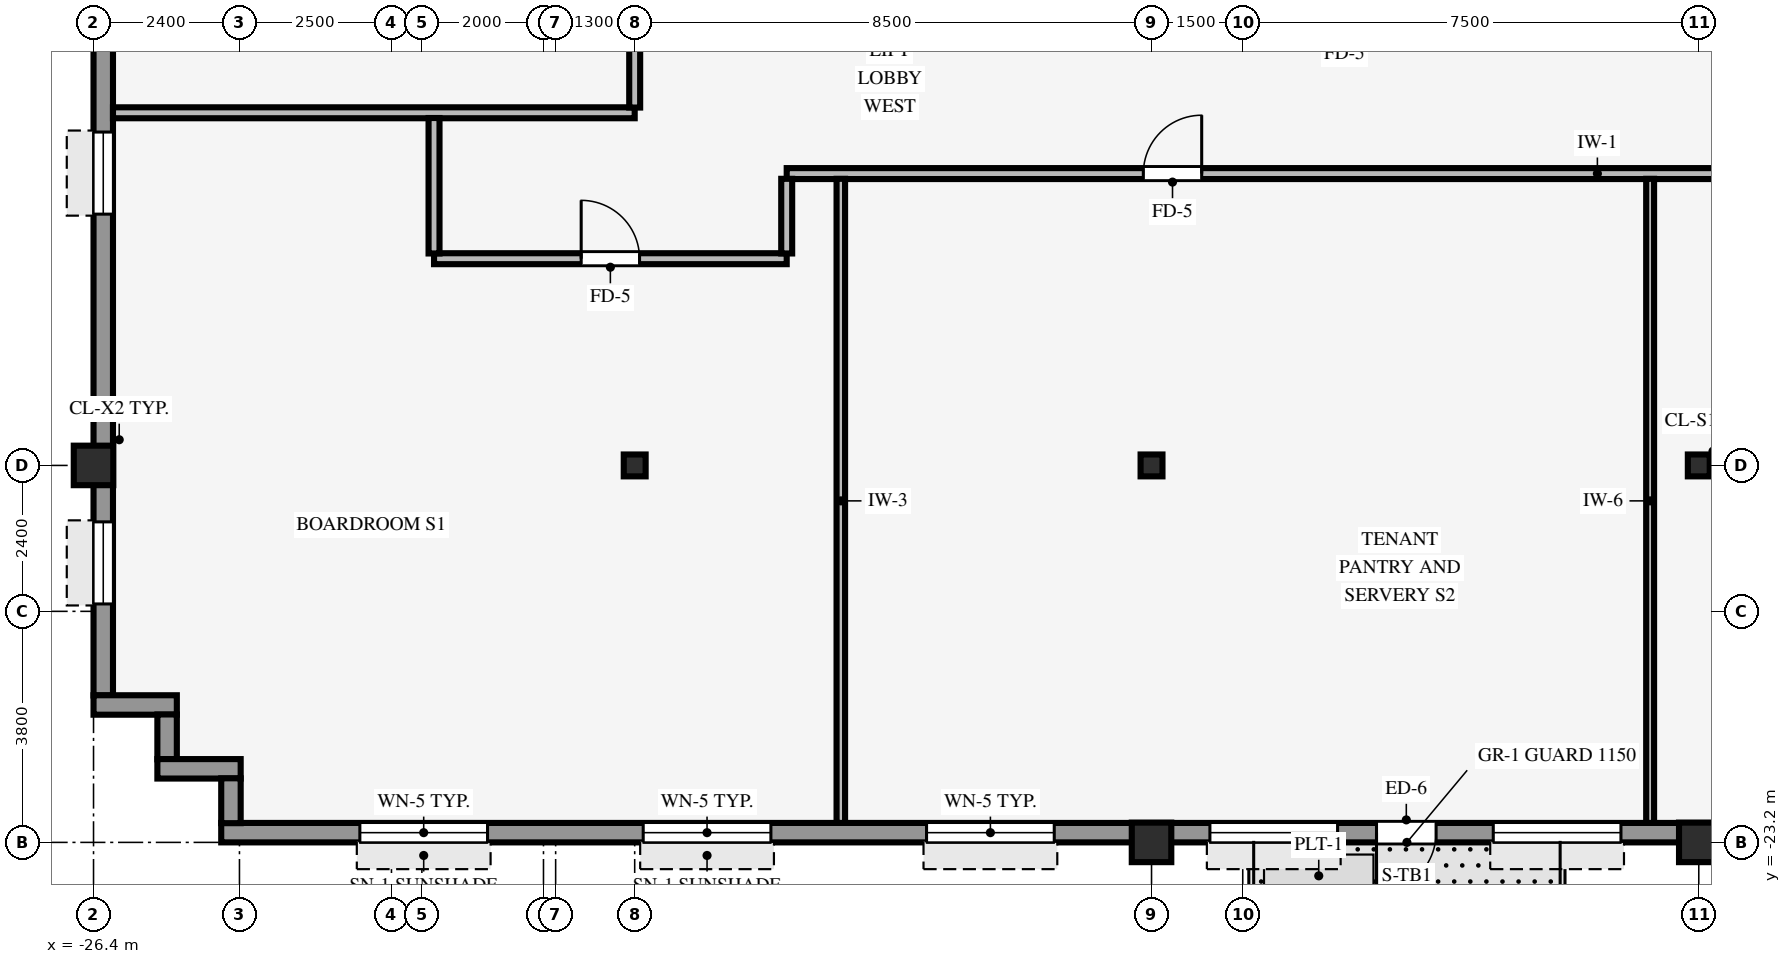
"""IFC4 building model, lengths in metres.
Left out: names, types, materials, properties, quantities, classifications, styles, units other than length and angle.
Written with IfcOpenShell. Run it as: python <this file> out.ifc"""

import sys

from ifc_helpers import new_model, si_unit, direction, frame, frame_2d, origin, origin_2d, place, context, subcontext, project, spatial, rectangle, hollow_rectangle, i_section, extrude, source, transform, mapped, element, fill, save


model = new_model("IFC4")
c1 = context("Model", 3, precision=1e-05, world=origin(), true_north=direction((0.0, 1.0)))
c2 = subcontext(c1, "Body", "Model", "MODEL_VIEW")
j1 = project(units=[si_unit("LENGTHUNIT", "METRE"), si_unit("PLANEANGLEUNIT", "RADIAN")], contexts=[c1])
p1 = place(None, origin())
s1 = spatial("IfcSite", under=j1, at=p1, CompositionType="ELEMENT")
p2 = place(p1, origin())
s2 = spatial("IfcBuilding", under=s1, at=p2, CompositionType="ELEMENT")
p3 = place(p2, frame((0.0, 0.0, 116.55)))
s3 = spatial("IfcBuildingStorey", under=s2, at=p3, CompositionType="ELEMENT", Elevation=116.55)
p4 = place(p3, frame((-26.4, -17.0, -0.4), z_axis=(0.0, 0.0, 1.0), x_axis=(1.0, 0.0, 0.0)))
e1 = element("IfcColumn", 1, at=p4, inside=s3, PredefinedType="COLUMN", context=c2, shape_type="SweptSolid", body=[
    extrude(hollow_rectangle(XDim=0.65, YDim=0.65, WallThickness=0.04, InnerFilletRadius=0.04, OuterFilletRadius=0.08, at=origin_2d()), origin(), (0.0, 0.0, 1.0), 3.77),
])
for number, where, z_axis, x_axis in (
    (2, (-9.0, -23.2, 0.0), (0.0, 0.0, 1.0), (1.0, 0.0, 0.0)),
    (3, (0.0, -23.2, 0.0), (0.0, 0.0, 1.0), (1.0, 0.0, 0.0)),
):
    element("IfcColumn", number, at=place(p3, frame(where, z_axis=z_axis, x_axis=x_axis)), inside=s3, PredefinedType="COLUMN", context=c2, shape_type="SweptSolid", body=[
        extrude(hollow_rectangle(XDim=0.65, YDim=0.65, WallThickness=0.04, InnerFilletRadius=0.04, OuterFilletRadius=0.08, at=origin_2d()), origin(), (0.0, 0.0, 1.0), 3.37),
    ])
for number, where, z_axis, x_axis in (
    (4, (0.0, -17.0, 0.0), (0.0, 0.0, 1.0), (1.0, 0.0, 0.0)),
    (5, (-17.5, -17.0, 0.0), (0.0, 0.0, 1.0), (1.0, 0.0, 0.0)),
    (6, (-9.0, -17.0, 0.0), (0.0, 0.0, 1.0), (1.0, 0.0, 0.0)),
):
    element("IfcColumn", number, at=place(p3, frame(where, z_axis=z_axis, x_axis=x_axis)), inside=s3, PredefinedType="COLUMN", context=c2, shape_type="SweptSolid", body=[
        extrude(i_section(OverallWidth=0.36, OverallDepth=0.36, WebThickness=0.021, FlangeThickness=0.021, FilletRadius=0.018, at=origin_2d()), origin(), (0.0, 0.0, 1.0), 3.37),
    ])
p5 = place(p3, frame((-24.3, -23.04, 0.0), z_axis=(0.0, 0.0, 1.0), x_axis=(1.0, 0.0, 0.0)))
e7 = element("IfcWall", 7, at=p5, inside=s3, PredefinedType="STANDARD", context=c2, shape_type="SweptSolid", body=[
    extrude(rectangle(XDim=48.6, YDim=0.32, at=frame_2d((24.3, 0.0))), origin(), (0.0, 0.0, 1.0), 2.705),
])
p6 = place(p5, frame((19.98, 0.0, 0.0), z_axis=(0.0, 0.0, 1.0), x_axis=(-1.0, 0.0, 0.0)))
e8 = element("IfcOpeningElement", 8, at=p6, cuts=e7, PredefinedType="OPENING", context=c2, shape_type="SweptSolid", body=[
    extrude(rectangle(XDim=0.98, YDim=2.15, at=frame_2d((0.49, 1.075))), frame((0.0, 0.17, 0.0), z_axis=(0.0, -1.0, 0.0), x_axis=(1.0, 0.0, 0.0)), (0.0, 0.0, 1.0), 0.34),
])
p7 = place(p5, frame((2.28, 0.0, 0.8)))
e9 = element("IfcOpeningElement", 9, at=p7, cuts=e7, PredefinedType="OPENING", context=c2, shape_type="SweptSolid", body=[
    extrude(rectangle(XDim=2.1, YDim=1.56, at=frame_2d((1.05, 0.78))), frame((0.0, 0.17, 0.0), z_axis=(0.0, -1.0, 0.0), x_axis=(1.0, 0.0, 0.0)), (0.0, 0.0, 1.0), 0.34),
])
p8 = place(p5, frame((6.94, 0.0, 0.8)))
e10 = element("IfcOpeningElement", 10, at=p8, cuts=e7, PredefinedType="OPENING", context=c2, shape_type="SweptSolid", body=[
    extrude(rectangle(XDim=2.1, YDim=1.56, at=frame_2d((1.05, 0.78))), frame((0.0, 0.17, 0.0), z_axis=(0.0, -1.0, 0.0), x_axis=(1.0, 0.0, 0.0)), (0.0, 0.0, 1.0), 0.34),
])
p9 = place(p5, frame((11.6, 0.0, 0.8)))
e11 = element("IfcOpeningElement", 11, at=p9, cuts=e7, PredefinedType="OPENING", context=c2, shape_type="SweptSolid", body=[
    extrude(rectangle(XDim=2.1, YDim=1.56, at=frame_2d((1.05, 0.78))), frame((0.0, 0.17, 0.0), z_axis=(0.0, -1.0, 0.0), x_axis=(1.0, 0.0, 0.0)), (0.0, 0.0, 1.0), 0.34),
])
p10 = place(p5, frame((16.26, 0.0, 0.8)))
e12 = element("IfcOpeningElement", 12, at=p10, cuts=e7, PredefinedType="OPENING", context=c2, shape_type="SweptSolid", body=[
    extrude(rectangle(XDim=2.1, YDim=1.56, at=frame_2d((1.05, 0.78))), frame((0.0, 0.17, 0.0), z_axis=(0.0, -1.0, 0.0), x_axis=(1.0, 0.0, 0.0)), (0.0, 0.0, 1.0), 0.34),
])
p11 = place(p5, frame((20.92, 0.0, 0.8)))
e13 = element("IfcOpeningElement", 13, at=p11, cuts=e7, PredefinedType="OPENING", context=c2, shape_type="SweptSolid", body=[
    extrude(rectangle(XDim=2.1, YDim=1.56, at=frame_2d((1.05, 0.78))), frame((0.0, 0.17, 0.0), z_axis=(0.0, -1.0, 0.0), x_axis=(1.0, 0.0, 0.0)), (0.0, 0.0, 1.0), 0.34),
])
p12 = place(p5, frame((25.58, 0.0, 0.8)))
e14 = element("IfcOpeningElement", 14, at=p12, cuts=e7, PredefinedType="OPENING", context=c2, shape_type="SweptSolid", body=[
    extrude(rectangle(XDim=2.1, YDim=1.56, at=frame_2d((1.05, 0.78))), frame((0.0, 0.17, 0.0), z_axis=(0.0, -1.0, 0.0), x_axis=(1.0, 0.0, 0.0)), (0.0, 0.0, 1.0), 0.34),
])
p13 = place(p5, frame((30.24, 0.0, 0.8)))
e15 = element("IfcOpeningElement", 15, at=p13, cuts=e7, PredefinedType="OPENING", context=c2, shape_type="SweptSolid", body=[
    extrude(rectangle(XDim=2.1, YDim=1.56, at=frame_2d((1.05, 0.78))), frame((0.0, 0.17, 0.0), z_axis=(0.0, -1.0, 0.0), x_axis=(1.0, 0.0, 0.0)), (0.0, 0.0, 1.0), 0.34),
])
p14 = place(p5, frame((36.25, 0.0, 0.8)))
e16 = element("IfcOpeningElement", 16, at=p14, cuts=e7, PredefinedType="OPENING", context=c2, shape_type="SweptSolid", body=[
    extrude(rectangle(XDim=2.1, YDim=1.56, at=frame_2d((1.05, 0.78))), frame((0.0, 0.17, 0.0), z_axis=(0.0, -1.0, 0.0), x_axis=(1.0, 0.0, 0.0)), (0.0, 0.0, 1.0), 0.34),
])
p15 = place(p5, frame((39.56, 0.0, 0.8)))
e17 = element("IfcOpeningElement", 17, at=p15, cuts=e7, PredefinedType="OPENING", context=c2, shape_type="SweptSolid", body=[
    extrude(rectangle(XDim=2.1, YDim=1.56, at=frame_2d((1.05, 0.78))), frame((0.0, 0.17, 0.0), z_axis=(0.0, -1.0, 0.0), x_axis=(1.0, 0.0, 0.0)), (0.0, 0.0, 1.0), 0.34),
])
p16 = place(p5, frame((45.57, 0.0, 0.8)))
e18 = element("IfcOpeningElement", 18, at=p16, cuts=e7, PredefinedType="OPENING", context=c2, shape_type="SweptSolid", body=[
    extrude(rectangle(XDim=2.1, YDim=1.56, at=frame_2d((1.05, 0.78))), frame((0.0, 0.17, 0.0), z_axis=(0.0, -1.0, 0.0), x_axis=(1.0, 0.0, 0.0)), (0.0, 0.0, 1.0), 0.34),
])
p17 = place(p3, frame((-26.24, -20.784, 0.0), z_axis=(0.0, 0.0, 1.0), x_axis=(0.0, 1.0, 0.0)))
e19 = element("IfcWall", 19, at=p17, inside=s3, PredefinedType="STANDARD", context=c2, shape_type="SweptSolid", body=[
    extrude(rectangle(XDim=17.184, YDim=0.32, at=frame_2d((8.592, 0.0))), origin(), (0.0, 0.0, 1.0), 2.705),
])
p18 = place(p17, frame((1.506, 0.0, 0.8)))
e20 = element("IfcOpeningElement", 20, at=p18, cuts=e19, PredefinedType="OPENING", context=c2, shape_type="SweptSolid", body=[
    extrude(rectangle(XDim=1.35, YDim=1.56, at=frame_2d((0.675, 0.78))), frame((0.0, 0.17, 0.0), z_axis=(0.0, -1.0, 0.0), x_axis=(1.0, 0.0, 0.0)), (0.0, 0.0, 1.0), 0.34),
])
p19 = place(p17, frame((7.917, 0.0, 0.8)))
e21 = element("IfcOpeningElement", 21, at=p19, cuts=e19, PredefinedType="OPENING", context=c2, shape_type="SweptSolid", body=[
    extrude(rectangle(XDim=1.35, YDim=1.56, at=frame_2d((0.675, 0.78))), frame((0.0, 0.17, 0.0), z_axis=(0.0, -1.0, 0.0), x_axis=(1.0, 0.0, 0.0)), (0.0, 0.0, 1.0), 0.34),
])
p20 = place(p17, frame((12.978, 0.0, 0.8)))
e22 = element("IfcOpeningElement", 22, at=p20, cuts=e19, PredefinedType="OPENING", context=c2, shape_type="SweptSolid", body=[
    extrude(rectangle(XDim=1.35, YDim=1.56, at=frame_2d((0.675, 0.78))), frame((0.0, 0.17, 0.0), z_axis=(0.0, -1.0, 0.0), x_axis=(1.0, 0.0, 0.0)), (0.0, 0.0, 1.0), 0.34),
])
p21 = place(p3, frame((-26.4, -20.94, 0.0), z_axis=(0.0, 0.0, 1.0), x_axis=(1.0, 0.0, 0.0)))
e23 = element("IfcWall", 23, at=p21, inside=s3, PredefinedType="STANDARD", context=c2, shape_type="SweptSolid", body=[
    extrude(rectangle(XDim=1.37, YDim=0.32, at=frame_2d((0.685, 0.0))), origin(), (0.0, 0.0, 1.0), 3.36),
])
p22 = place(p3, frame((-25.19, -21.834, 0.0), z_axis=(0.0, 0.0, 1.0), x_axis=(0.0, 1.0, 0.0)))
e24 = element("IfcWall", 24, at=p22, inside=s3, PredefinedType="STANDARD", context=c2, shape_type="SweptSolid", body=[
    extrude(rectangle(XDim=0.738, YDim=0.32, at=frame_2d((0.369, 0.0))), origin(), (0.0, 0.0, 1.0), 3.36),
])
p23 = place(p3, frame((-25.35, -21.99, 0.0), z_axis=(0.0, 0.0, 1.0), x_axis=(1.0, 0.0, 0.0)))
e25 = element("IfcWall", 25, at=p23, inside=s3, PredefinedType="STANDARD", context=c2, shape_type="SweptSolid", body=[
    extrude(rectangle(XDim=1.37, YDim=0.32, at=frame_2d((0.685, 0.0))), origin(), (0.0, 0.0, 1.0), 3.36),
])
p24 = place(p3, frame((-24.14, -22.884, 0.0), z_axis=(0.0, 0.0, 1.0), x_axis=(0.0, 1.0, 0.0)))
e26 = element("IfcWall", 26, at=p24, inside=s3, PredefinedType="STANDARD", context=c2, shape_type="SweptSolid", body=[
    extrude(rectangle(XDim=0.738, YDim=0.32, at=frame_2d((0.369, 0.0))), origin(), (0.0, 0.0, 1.0), 3.36),
])
p25 = place(p3, frame((-20.8, -13.6, 0.0), z_axis=(0.0, 0.0, 1.0), x_axis=(1.0, 0.0, 0.0)))
e27 = element("IfcWall", 27, at=p25, inside=s3, PredefinedType="PARTITIONING", context=c2, shape_type="SweptSolid", body=[
    extrude(rectangle(XDim=5.8, YDim=0.18, at=frame_2d((2.9, 0.0))), origin(), (0.0, 0.0, 1.0), 2.998),
])
p26 = place(p25, frame((2.42, 0.0, 0.0)))
e28 = element("IfcOpeningElement", 28, at=p26, cuts=e27, PredefinedType="OPENING", context=c2, shape_type="SweptSolid", body=[
    extrude(rectangle(XDim=0.96, YDim=2.1, at=frame_2d((0.48, 1.05))), frame((0.0, 0.1, 0.0), z_axis=(0.0, -1.0, 0.0), x_axis=(1.0, 0.0, 0.0)), (0.0, 0.0, 1.0), 0.2),
])
p27 = place(p3, frame((-15.0, -12.2, 0.0), z_axis=(0.0, 0.0, 1.0), x_axis=(1.0, 0.0, 0.0)))
e29 = element("IfcWall", 29, at=p27, inside=s3, PredefinedType="PARTITIONING", context=c2, shape_type="SweptSolid", body=[
    extrude(rectangle(XDim=30.0, YDim=0.18, at=frame_2d((15.0, 0.0))), origin(), (0.0, 0.0, 1.0), 3.36),
])
p28 = place(p27, frame((19.84, 0.0, 0.0)))
e30 = element("IfcOpeningElement", 30, at=p28, cuts=e29, PredefinedType="OPENING", context=c2, shape_type="SweptSolid", body=[
    extrude(rectangle(XDim=0.96, YDim=2.1, at=frame_2d((0.48, 1.05))), frame((0.0, 0.1, 0.0), z_axis=(0.0, -1.0, 0.0), x_axis=(1.0, 0.0, 0.0)), (0.0, 0.0, 1.0), 0.2),
])
p29 = place(p27, frame((5.865, 0.0, 0.0)))
e31 = element("IfcOpeningElement", 31, at=p29, cuts=e29, PredefinedType="OPENING", context=c2, shape_type="SweptSolid", body=[
    extrude(rectangle(XDim=0.96, YDim=2.1, at=frame_2d((0.48, 1.05))), frame((0.0, 0.1, 0.0), z_axis=(0.0, -1.0, 0.0), x_axis=(1.0, 0.0, 0.0)), (0.0, 0.0, 1.0), 0.2),
])
p30 = place(p3, frame((-26.08, -11.2, 0.0), z_axis=(0.0, 0.0, 1.0), x_axis=(1.0, 0.0, 0.0)))
e32 = element("IfcWall", 32, at=p30, inside=s3, PredefinedType="PARTITIONING", context=c2, shape_type="SweptSolid", body=[
    extrude(rectangle(XDim=8.58, YDim=0.18, at=frame_2d((4.29, 0.0))), origin(), (0.0, 0.0, 1.0), 3.36),
])
p31 = place(p3, frame((-20.8, -13.514, 0.0), z_axis=(0.0, 0.0, 1.0), x_axis=(0.0, 1.0, 0.0)))
e33 = element("IfcWall", 33, at=p31, inside=s3, PredefinedType="PARTITIONING", context=c2, shape_type="SweptSolid", body=[
    extrude(rectangle(XDim=2.228, YDim=0.18, at=frame_2d((1.114, 0.0))), origin(), (0.0, 0.0, 1.0), 3.36),
])
p32 = place(p3, frame((-17.5, -11.114, 0.0), z_axis=(0.0, 0.0, 1.0), x_axis=(0.0, 1.0, 0.0)))
e34 = element("IfcWall", 34, at=p32, inside=s3, PredefinedType="PARTITIONING", context=c2, shape_type="SweptSolid", body=[
    extrude(rectangle(XDim=0.968, YDim=0.18, at=frame_2d((0.484, 0.0))), origin(), (0.0, 0.0, 1.0), 2.738),
])
p33 = place(p3, frame((-15.0, -13.514, 0.0), z_axis=(0.0, 0.0, 1.0), x_axis=(0.0, 1.0, 0.0)))
e35 = element("IfcWall", 35, at=p33, inside=s3, PredefinedType="PARTITIONING", context=c2, shape_type="SweptSolid", body=[
    extrude(rectangle(XDim=1.228, YDim=0.18, at=frame_2d((0.614, 0.0))), origin(), (0.0, 0.0, 1.0), 3.36),
])
p34 = place(p3, frame((-14.11, -22.88, 0.0), z_axis=(0.0, 0.0, 1.0), x_axis=(0.0, 1.0, 0.0)))
e36 = element("IfcWall", 36, at=p34, inside=s3, PredefinedType="PARTITIONING", context=c2, shape_type="SweptSolid", body=[
    extrude(rectangle(XDim=10.594, YDim=0.14, at=frame_2d((5.297, 0.0))), origin(), (0.0, 0.0, 1.0), 3.36),
])
p35 = place(p3, frame((-0.8, -22.88, 0.0), z_axis=(0.0, 0.0, 1.0), x_axis=(0.0, 1.0, 0.0)))
e37 = element("IfcWall", 37, at=p35, inside=s3, PredefinedType="PARTITIONING", context=c2, shape_type="SweptSolid", body=[
    extrude(rectangle(XDim=10.594, YDim=0.13, at=frame_2d((5.297, 0.0))), origin(), (0.0, 0.0, 1.0), 3.36),
])
m1 = source(origin(), c2, "Body", "SweptSolid", [
    extrude(rectangle(XDim=0.98, YDim=2.15, at=frame_2d((0.49, 1.075))), frame((0.0, 0.025, 0.0), z_axis=(0.0, -1.0, 0.0), x_axis=(1.0, 0.0, 0.0)), (0.0, 0.0, 1.0), 0.05),
])
p36 = place(p6, origin())
e38 = element("IfcDoor", 38, at=p36, inside=s3, OperationType="SINGLE_SWING_RIGHT", PredefinedType="DOOR", context=c2, shape_type="MappedRepresentation", body=[
    mapped(m1, transform((0.0, 0.0, 0.0), scale=1.0)),
])
fill(e8, e38)
m2 = source(origin(), c2, "Body", "SweptSolid", [
    extrude(rectangle(XDim=2.1, YDim=1.56, at=frame_2d((1.05, 0.78))), frame((0.0, 0.03, 0.0), z_axis=(0.0, -1.0, 0.0), x_axis=(1.0, 0.0, 0.0)), (0.0, 0.0, 1.0), 0.06),
])
p37 = place(p7, origin())
e39 = element("IfcWindow", 39, at=p37, inside=s3, PartitioningType="SINGLE_PANEL", PredefinedType="WINDOW", context=c2, shape_type="MappedRepresentation", body=[
    mapped(m2, transform((0.0, 0.0, 0.0), scale=1.0)),
])
fill(e9, e39)
p38 = place(p8, origin())
e40 = element("IfcWindow", 40, at=p38, inside=s3, PartitioningType="SINGLE_PANEL", PredefinedType="WINDOW", context=c2, shape_type="MappedRepresentation", body=[
    mapped(m2, transform((0.0, 0.0, 0.0), scale=1.0)),
])
fill(e10, e40)
p39 = place(p9, origin())
e41 = element("IfcWindow", 41, at=p39, inside=s3, PartitioningType="SINGLE_PANEL", PredefinedType="WINDOW", context=c2, shape_type="MappedRepresentation", body=[
    mapped(m2, transform((0.0, 0.0, 0.0), scale=1.0)),
])
fill(e11, e41)
p40 = place(p10, origin())
e42 = element("IfcWindow", 42, at=p40, inside=s3, PartitioningType="SINGLE_PANEL", PredefinedType="WINDOW", context=c2, shape_type="MappedRepresentation", body=[
    mapped(m2, transform((0.0, 0.0, 0.0), scale=1.0)),
])
fill(e12, e42)
p41 = place(p11, origin())
e43 = element("IfcWindow", 43, at=p41, inside=s3, PartitioningType="SINGLE_PANEL", PredefinedType="WINDOW", context=c2, shape_type="MappedRepresentation", body=[
    mapped(m2, transform((0.0, 0.0, 0.0), scale=1.0)),
])
fill(e13, e43)
m3 = source(origin(), c2, "Body", "SweptSolid", [
    extrude(rectangle(XDim=1.35, YDim=1.56, at=frame_2d((0.675, 0.78))), frame((0.0, 0.03, 0.0), z_axis=(0.0, -1.0, 0.0), x_axis=(1.0, 0.0, 0.0)), (0.0, 0.0, 1.0), 0.06),
])
p42 = place(p18, origin())
e44 = element("IfcWindow", 44, at=p42, inside=s3, PartitioningType="SINGLE_PANEL", PredefinedType="WINDOW", context=c2, shape_type="MappedRepresentation", body=[
    mapped(m3, transform((0.0, 0.0, 0.0), scale=1.0)),
])
fill(e20, e44)
p43 = place(p19, origin())
e45 = element("IfcWindow", 45, at=p43, inside=s3, PartitioningType="SINGLE_PANEL", PredefinedType="WINDOW", context=c2, shape_type="MappedRepresentation", body=[
    mapped(m3, transform((0.0, 0.0, 0.0), scale=1.0)),
])
fill(e21, e45)
m4 = source(origin(), c2, "Body", "SweptSolid", [
    extrude(rectangle(XDim=0.96, YDim=2.1, at=frame_2d((0.48, 1.05))), frame((0.0, 0.025, 0.0), z_axis=(0.0, -1.0, 0.0), x_axis=(1.0, 0.0, 0.0)), (0.0, 0.0, 1.0), 0.05),
])
p44 = place(p29, origin())
e46 = element("IfcDoor", 46, at=p44, inside=s3, OperationType="SINGLE_SWING_RIGHT", PredefinedType="DOOR", context=c2, shape_type="MappedRepresentation", body=[
    mapped(m4, transform((0.0, 0.0, 0.0), scale=1.0)),
])
fill(e31, e46)
p45 = place(p26, origin())
e47 = element("IfcDoor", 47, at=p45, inside=s3, OperationType="SINGLE_SWING_LEFT", PredefinedType="DOOR", context=c2, shape_type="MappedRepresentation", body=[
    mapped(m4, transform((0.0, 0.0, 0.0), scale=1.0)),
])
fill(e28, e47)
save(model, sys.argv[1])
